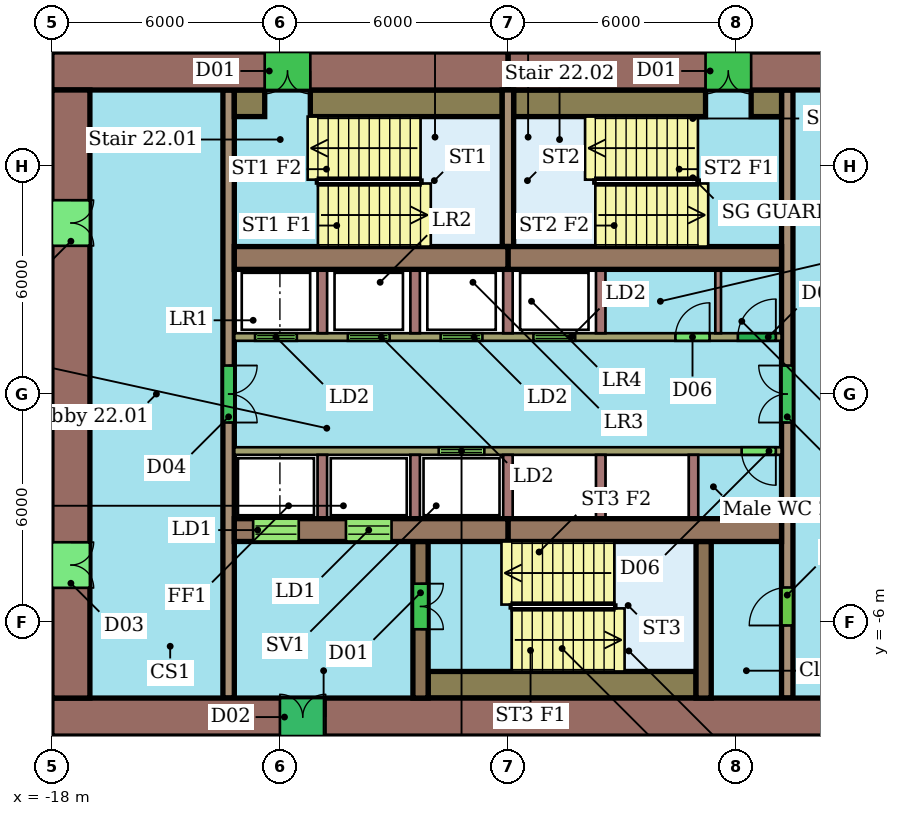
"""IFC4 building model, lengths in metres.
Left out: names, types, materials, properties, quantities, classifications, styles, units other than length and angle.
Written with IfcOpenShell. Run it as: python <this file> out.ifc"""

import sys

from ifc_helpers import new_model, si_unit, direction, frame, frame_2d, origin, place, context, subcontext, project, spatial, rectangle, extrude, element, fill, save


model = new_model("IFC4")
c1 = context("Model", 3, precision=1e-05, world=origin(), true_north=direction((0.0, 1.0)))
c2 = subcontext(c1, "Body", "Model", "MODEL_VIEW")
j1 = project(units=[si_unit("LENGTHUNIT", "METRE"), si_unit("PLANEANGLEUNIT", "RADIAN")], contexts=[c1])
p1 = place(None, origin())
s1 = spatial("IfcSite", under=j1, at=p1, CompositionType="ELEMENT")
p2 = place(p1, origin())
s2 = spatial("IfcBuilding", under=s1, at=p2, CompositionType="ELEMENT")
p3 = place(p2, frame((0.0, 0.0, 99.4)))
s3 = spatial("IfcBuildingStorey", under=s2, at=p3, CompositionType="ELEMENT", Elevation=99.4)
p4 = place(p3, frame((6.0, 8.5, 0.0), z_axis=(0.0, 0.0, 1.0), x_axis=(-1.0, 0.0, 0.0)))
e1 = element("IfcWall", 1, at=p4, inside=s3, PredefinedType="SHEAR", context=c2, shape_type="SweptSolid", body=[
    extrude(rectangle(XDim=12.0, YDim=1.0, at=frame_2d((6.0, 0.0))), origin(), (0.0, 0.0, 1.0), 3.3),
])
p5 = place(p4, frame((5.6, 0.0, 0.0)))
e2 = element("IfcOpeningElement", 2, at=p5, cuts=e1, PredefinedType="OPENING", context=c2, shape_type="SweptSolid", body=[
    extrude(rectangle(XDim=1.2, YDim=2.1, at=frame_2d((0.6, 1.05))), frame((0.0, 0.51, 0.0), z_axis=(0.0, -1.0, 0.0), x_axis=(1.0, 0.0, 0.0)), (0.0, 0.0, 1.0), 1.02),
])
p6 = place(p3, frame((-6.0, 8.5, 0.0), z_axis=(0.0, 0.0, 1.0), x_axis=(-1.0, 0.0, 0.0)))
e3 = element("IfcWall", 3, at=p6, inside=s3, PredefinedType="SHEAR", context=c2, shape_type="SweptSolid", body=[
    extrude(rectangle(XDim=12.0, YDim=1.0, at=frame_2d((6.0, 0.0))), origin(), (0.0, 0.0, 1.0), 3.3),
])
p7 = place(p6, frame((5.2, 0.0, 0.0)))
e4 = element("IfcOpeningElement", 4, at=p7, cuts=e3, PredefinedType="OPENING", context=c2, shape_type="SweptSolid", body=[
    extrude(rectangle(XDim=1.2, YDim=2.1, at=frame_2d((0.6, 1.05))), frame((0.0, 0.51, 0.0), z_axis=(0.0, -1.0, 0.0), x_axis=(1.0, 0.0, 0.0)), (0.0, 0.0, 1.0), 1.02),
])
p8 = place(p3, frame((-18.0, -8.5, 0.0), z_axis=(0.0, 0.0, 1.0), x_axis=(1.0, 0.0, 0.0)))
e5 = element("IfcWall", 5, at=p8, inside=s3, PredefinedType="SHEAR", context=c2, shape_type="SweptSolid", body=[
    extrude(rectangle(XDim=24.0, YDim=1.0, at=frame_2d((12.0, 0.0))), origin(), (0.0, 0.0, 1.0), 3.3),
])
p9 = place(p8, frame((6.0, 0.0, 0.0)))
e6 = element("IfcOpeningElement", 6, at=p9, cuts=e5, PredefinedType="OPENING", context=c2, shape_type="SweptSolid", body=[
    extrude(rectangle(XDim=1.2, YDim=2.1, at=frame_2d((0.6, 1.05))), frame((0.0, 0.51, 0.0), z_axis=(0.0, -1.0, 0.0), x_axis=(1.0, 0.0, 0.0)), (0.0, 0.0, 1.0), 1.02),
])
p10 = place(p3, frame((-17.5, 8.0, 0.0), z_axis=(0.0, 0.0, 1.0), x_axis=(0.0, -1.0, 0.0)))
e7 = element("IfcWall", 7, at=p10, inside=s3, PredefinedType="SHEAR", context=c2, shape_type="SweptSolid", body=[
    extrude(rectangle(XDim=16.0, YDim=1.0, at=frame_2d((8.0, 0.0))), origin(), (0.0, 0.0, 1.0), 3.3),
])
p11 = place(p10, frame((11.9, 0.0, 0.0)))
e8 = element("IfcOpeningElement", 8, at=p11, cuts=e7, PredefinedType="OPENING", context=c2, shape_type="SweptSolid", body=[
    extrude(rectangle(XDim=1.2, YDim=2.1, at=frame_2d((0.6, 1.05))), frame((0.0, 0.51, 0.0), z_axis=(0.0, -1.0, 0.0), x_axis=(1.0, 0.0, 0.0)), (0.0, 0.0, 1.0), 1.02),
])
p12 = place(p10, frame((2.9, 0.0, 0.0)))
e9 = element("IfcOpeningElement", 9, at=p12, cuts=e7, PredefinedType="OPENING", context=c2, shape_type="SweptSolid", body=[
    extrude(rectangle(XDim=1.2, YDim=2.1, at=frame_2d((0.6, 1.05))), frame((0.0, 0.51, 0.0), z_axis=(0.0, -1.0, 0.0), x_axis=(1.0, 0.0, 0.0)), (0.0, 0.0, 1.0), 1.02),
])
for number, where, z_axis, x_axis in (
    (10, (-13.2, 3.58, 0.0), (0.0, 0.0, 1.0), (1.0, 0.0, 0.0)),
    (11, (-6.0, 3.58, 0.0), (0.0, 0.0, 1.0), (1.0, 0.0, 0.0)),
):
    element("IfcWall", number, at=place(p3, frame(where, z_axis=z_axis, x_axis=x_axis)), inside=s3, PredefinedType="SHEAR", context=c2, shape_type="SweptSolid", body=[
        extrude(rectangle(XDim=7.2, YDim=0.6, at=frame_2d((3.6, 0.0))), origin(), (0.0, 0.0, 1.0), 3.3),
    ])
p13 = place(p3, frame((-13.2, -3.58, 0.0), z_axis=(0.0, 0.0, 1.0), x_axis=(1.0, 0.0, 0.0)))
e12 = element("IfcWall", 12, at=p13, inside=s3, PredefinedType="SHEAR", context=c2, shape_type="SweptSolid", body=[
    extrude(rectangle(XDim=7.2, YDim=0.6, at=frame_2d((3.6, 0.0))), origin(), (0.0, 0.0, 1.0), 3.3),
])
p14 = place(p13, frame((0.496, 0.0, 0.0)))
e13 = element("IfcOpeningElement", 13, at=p14, cuts=e12, PredefinedType="OPENING", context=c2, shape_type="SweptSolid", body=[
    extrude(rectangle(XDim=1.2, YDim=2.1, at=frame_2d((0.6, 1.05))), frame((0.0, 0.31, 0.0), z_axis=(0.0, -1.0, 0.0), x_axis=(1.0, 0.0, 0.0)), (0.0, 0.0, 1.0), 0.62),
])
p15 = place(p13, frame((2.938, 0.0, 0.0)))
e14 = element("IfcOpeningElement", 14, at=p15, cuts=e12, PredefinedType="OPENING", context=c2, shape_type="SweptSolid", body=[
    extrude(rectangle(XDim=1.2, YDim=2.1, at=frame_2d((0.6, 1.05))), frame((0.0, 0.31, 0.0), z_axis=(0.0, -1.0, 0.0), x_axis=(1.0, 0.0, 0.0)), (0.0, 0.0, 1.0), 0.62),
])
p16 = place(p3, frame((-6.0, -3.58, 0.0), z_axis=(0.0, 0.0, 1.0), x_axis=(1.0, 0.0, 0.0)))
e15 = element("IfcWall", 15, at=p16, inside=s3, PredefinedType="SHEAR", context=c2, shape_type="SweptSolid", body=[
    extrude(rectangle(XDim=7.2, YDim=0.6, at=frame_2d((3.6, 0.0))), origin(), (0.0, 0.0, 1.0), 3.3),
])
p17 = place(p3, frame((-13.35, 8.0, 0.0), z_axis=(0.0, 0.0, 1.0), x_axis=(0.0, -1.0, 0.0)))
e16 = element("IfcWall", 16, at=p17, inside=s3, PredefinedType="SHEAR", context=c2, shape_type="SweptSolid", body=[
    extrude(rectangle(XDim=16.0, YDim=0.3, at=frame_2d((8.0, 0.0))), origin(), (0.0, 0.0, 1.0), 3.3),
])
p18 = place(p17, frame((7.25, 0.0, 0.0)))
e17 = element("IfcOpeningElement", 17, at=p18, cuts=e16, PredefinedType="OPENING", context=c2, shape_type="SweptSolid", body=[
    extrude(rectangle(XDim=1.5, YDim=2.1, at=frame_2d((0.75, 1.05))), frame((0.0, 0.16, 0.0), z_axis=(0.0, -1.0, 0.0), x_axis=(1.0, 0.0, 0.0)), (0.0, 0.0, 1.0), 0.32),
])
p19 = place(p3, frame((1.35, -8.0, 0.0), z_axis=(0.0, 0.0, 1.0), x_axis=(0.0, 1.0, 0.0)))
e18 = element("IfcWall", 18, at=p19, inside=s3, PredefinedType="SHEAR", context=c2, shape_type="SweptSolid", body=[
    extrude(rectangle(XDim=16.0, YDim=0.3, at=frame_2d((8.0, 0.0))), origin(), (0.0, 0.0, 1.0), 3.3),
])
p20 = place(p19, frame((1.91, 0.0, 0.0)))
e19 = element("IfcOpeningElement", 19, at=p20, cuts=e18, PredefinedType="OPENING", context=c2, shape_type="SweptSolid", body=[
    extrude(rectangle(XDim=1.0, YDim=2.1, at=frame_2d((0.5, 1.05))), frame((0.0, 0.16, 0.0), z_axis=(0.0, -1.0, 0.0), x_axis=(1.0, 0.0, 0.0)), (0.0, 0.0, 1.0), 0.32),
])
p21 = place(p19, frame((7.25, 0.0, 0.0)))
e20 = element("IfcOpeningElement", 20, at=p21, cuts=e18, PredefinedType="OPENING", context=c2, shape_type="SweptSolid", body=[
    extrude(rectangle(XDim=1.5, YDim=2.1, at=frame_2d((0.75, 1.05))), frame((0.0, 0.16, 0.0), z_axis=(0.0, -1.0, 0.0), x_axis=(1.0, 0.0, 0.0)), (0.0, 0.0, 1.0), 0.32),
])
p22 = place(p3, frame((-13.2, 1.5, 0.0), z_axis=(0.0, 0.0, 1.0), x_axis=(1.0, 0.0, 0.0)))
e21 = element("IfcWall", 21, at=p22, inside=s3, PredefinedType="SHEAR", context=c2, shape_type="SweptSolid", body=[
    extrude(rectangle(XDim=14.4, YDim=0.2, at=frame_2d((7.2, 0.0))), origin(), (0.0, 0.0, 1.0), 3.3),
])
p23 = place(p22, frame((0.546, 0.0, 0.0)))
e22 = element("IfcOpeningElement", 22, at=p23, cuts=e21, PredefinedType="OPENING", context=c2, shape_type="SweptSolid", body=[
    extrude(rectangle(XDim=1.1, YDim=2.1, at=frame_2d((0.55, 1.05))), frame((0.0, 0.11, 0.0), z_axis=(0.0, -1.0, 0.0), x_axis=(1.0, 0.0, 0.0)), (0.0, 0.0, 1.0), 0.22),
])
p24 = place(p22, frame((2.988, 0.0, 0.0)))
e23 = element("IfcOpeningElement", 23, at=p24, cuts=e21, PredefinedType="OPENING", context=c2, shape_type="SweptSolid", body=[
    extrude(rectangle(XDim=1.1, YDim=2.1, at=frame_2d((0.55, 1.05))), frame((0.0, 0.11, 0.0), z_axis=(0.0, -1.0, 0.0), x_axis=(1.0, 0.0, 0.0)), (0.0, 0.0, 1.0), 0.22),
])
p25 = place(p22, frame((5.429, 0.0, 0.0)))
e24 = element("IfcOpeningElement", 24, at=p25, cuts=e21, PredefinedType="OPENING", context=c2, shape_type="SweptSolid", body=[
    extrude(rectangle(XDim=1.1, YDim=2.1, at=frame_2d((0.55, 1.05))), frame((0.0, 0.11, 0.0), z_axis=(0.0, -1.0, 0.0), x_axis=(1.0, 0.0, 0.0)), (0.0, 0.0, 1.0), 0.22),
])
p26 = place(p22, frame((7.871, 0.0, 0.0)))
e25 = element("IfcOpeningElement", 25, at=p26, cuts=e21, PredefinedType="OPENING", context=c2, shape_type="SweptSolid", body=[
    extrude(rectangle(XDim=1.1, YDim=2.1, at=frame_2d((0.55, 1.05))), frame((0.0, 0.11, 0.0), z_axis=(0.0, -1.0, 0.0), x_axis=(1.0, 0.0, 0.0)), (0.0, 0.0, 1.0), 0.22),
])
p27 = place(p22, frame((11.607, 0.0, 0.0)))
e26 = element("IfcOpeningElement", 26, at=p27, cuts=e21, PredefinedType="OPENING", context=c2, shape_type="SweptSolid", body=[
    extrude(rectangle(XDim=0.9, YDim=2.1, at=frame_2d((0.45, 1.05))), frame((0.0, 0.11, 0.0), z_axis=(0.0, -1.0, 0.0), x_axis=(1.0, 0.0, 0.0)), (0.0, 0.0, 1.0), 0.22),
])
p28 = place(p22, frame((13.25, 0.0, 0.0)))
e27 = element("IfcOpeningElement", 27, at=p28, cuts=e21, PredefinedType="OPENING", context=c2, shape_type="SweptSolid", body=[
    extrude(rectangle(XDim=1.0, YDim=2.1, at=frame_2d((0.5, 1.05))), frame((0.0, 0.11, 0.0), z_axis=(0.0, -1.0, 0.0), x_axis=(1.0, 0.0, 0.0)), (0.0, 0.0, 1.0), 0.22),
])
p29 = place(p3, frame((1.2, -1.5, 0.0), z_axis=(0.0, 0.0, 1.0), x_axis=(-1.0, 0.0, 0.0)))
e28 = element("IfcWall", 28, at=p29, inside=s3, PredefinedType="SHEAR", context=c2, shape_type="SweptSolid", body=[
    extrude(rectangle(XDim=14.4, YDim=0.2, at=frame_2d((7.2, 0.0))), origin(), (0.0, 0.0, 1.0), 3.3),
])
p30 = place(p29, frame((7.821, 0.0, 0.0)))
e29 = element("IfcOpeningElement", 29, at=p30, cuts=e28, PredefinedType="OPENING", context=c2, shape_type="SweptSolid", body=[
    extrude(rectangle(XDim=1.2, YDim=2.1, at=frame_2d((0.6, 1.05))), frame((0.0, 0.11, 0.0), z_axis=(0.0, -1.0, 0.0), x_axis=(1.0, 0.0, 0.0)), (0.0, 0.0, 1.0), 0.22),
])
p31 = place(p29, frame((0.15, 0.0, 0.0)))
e30 = element("IfcOpeningElement", 30, at=p31, cuts=e28, PredefinedType="OPENING", context=c2, shape_type="SweptSolid", body=[
    extrude(rectangle(XDim=0.9, YDim=2.1, at=frame_2d((0.45, 1.05))), frame((0.0, 0.11, 0.0), z_axis=(0.0, -1.0, 0.0), x_axis=(1.0, 0.0, 0.0)), (0.0, 0.0, 1.0), 0.22),
])
p32 = place(p3, frame((-8.3, -3.88, 0.0), z_axis=(0.0, 0.0, 1.0), x_axis=(0.0, -1.0, 0.0)))
e31 = element("IfcWall", 31, at=p32, inside=s3, PredefinedType="SHEAR", context=c2, shape_type="SweptSolid", body=[
    extrude(rectangle(XDim=4.12, YDim=0.4, at=frame_2d((2.06, 0.0))), origin(), (0.0, 0.0, 1.0), 3.3),
])
p33 = place(p32, frame((1.11, 0.0, 0.0)))
e32 = element("IfcOpeningElement", 32, at=p33, cuts=e31, PredefinedType="OPENING", context=c2, shape_type="SweptSolid", body=[
    extrude(rectangle(XDim=1.2, YDim=2.1, at=frame_2d((0.6, 1.05))), frame((0.0, 0.21, 0.0), z_axis=(0.0, -1.0, 0.0), x_axis=(1.0, 0.0, 0.0)), (0.0, 0.0, 1.0), 0.42),
])
p34 = place(p3, frame((-0.85, -3.88, 0.0), z_axis=(0.0, 0.0, 1.0), x_axis=(0.0, -1.0, 0.0)))
e33 = element("IfcWall", 33, at=p34, inside=s3, PredefinedType="SHEAR", context=c2, shape_type="SweptSolid", body=[
    extrude(rectangle(XDim=4.12, YDim=0.4, at=frame_2d((2.06, 0.0))), origin(), (0.0, 0.0, 1.0), 3.3),
])
p35 = place(p3, frame((-6.0, 3.88, 0.0), z_axis=(0.0, 0.0, 1.0), x_axis=(0.0, 1.0, 0.0)))
e34 = element("IfcWall", 34, at=p35, inside=s3, PredefinedType="SHEAR", context=c2, shape_type="SweptSolid", body=[
    extrude(rectangle(XDim=4.12, YDim=0.3, at=frame_2d((2.06, 0.0))), origin(), (0.0, 0.0, 1.0), 3.3),
])
p36 = place(p3, frame((-13.2, 7.65, 0.0), z_axis=(0.0, 0.0, 1.0), x_axis=(1.0, 0.0, 0.0)))
e35 = element("IfcWall", 35, at=p36, inside=s3, PredefinedType="SHEAR", context=c2, shape_type="SweptSolid", body=[
    extrude(rectangle(XDim=0.8, YDim=0.7, at=frame_2d((0.4, 0.0))), origin(), (0.0, 0.0, 1.0), 3.3),
])
for number, where, z_axis, x_axis in (
    (36, (-11.2, 7.65, 0.0), (0.0, 0.0, 1.0), (1.0, 0.0, 0.0)),
    (37, (-5.85, 7.65, 0.0), (0.0, 0.0, 1.0), (1.0, 0.0, 0.0)),
):
    element("IfcWall", number, at=place(p3, frame(where, z_axis=z_axis, x_axis=x_axis)), inside=s3, PredefinedType="SHEAR", context=c2, shape_type="SweptSolid", body=[
        extrude(rectangle(XDim=5.05, YDim=0.7, at=frame_2d((2.525, 0.0))), origin(), (0.0, 0.0, 1.0), 3.3),
    ])
p37 = place(p3, frame((0.4, 7.65, 0.0), z_axis=(0.0, 0.0, 1.0), x_axis=(1.0, 0.0, 0.0)))
e38 = element("IfcWall", 38, at=p37, inside=s3, PredefinedType="SHEAR", context=c2, shape_type="SweptSolid", body=[
    extrude(rectangle(XDim=0.8, YDim=0.7, at=frame_2d((0.4, 0.0))), origin(), (0.0, 0.0, 1.0), 3.3),
])
p38 = place(p3, frame((-8.1, -7.65, 0.0), z_axis=(0.0, 0.0, 1.0), x_axis=(1.0, 0.0, 0.0)))
e39 = element("IfcWall", 39, at=p38, inside=s3, PredefinedType="SHEAR", context=c2, shape_type="SweptSolid", body=[
    extrude(rectangle(XDim=7.05, YDim=0.7, at=frame_2d((3.525, 0.0))), origin(), (0.0, 0.0, 1.0), 3.3),
])
for number, where, z_axis, x_axis in (
    (40, (-10.883, 1.6, 0.0), (0.0, 0.0, 1.0), (0.0, 1.0, 0.0)),
    (41, (-8.442, 1.6, 0.0), (0.0, 0.0, 1.0), (0.0, 1.0, 0.0)),
    (42, (-6.0, 1.6, 0.0), (0.0, 0.0, 1.0), (0.0, 1.0, 0.0)),
    (43, (-3.558, 1.6, 0.0), (0.0, 0.0, 1.0), (0.0, 1.0, 0.0)),
):
    element("IfcWall", number, at=place(p3, frame(where, z_axis=z_axis, x_axis=x_axis)), inside=s3, PredefinedType="SHEAR", context=c2, shape_type="SweptSolid", body=[
        extrude(rectangle(XDim=1.68, YDim=0.25, at=frame_2d((0.84, 0.0))), origin(), (0.0, 0.0, 1.0), 3.3),
    ])
p39 = place(p3, frame((-0.468, 1.6, 0.0), z_axis=(0.0, 0.0, 1.0), x_axis=(0.0, 1.0, 0.0)))
e44 = element("IfcWall", 44, at=p39, inside=s3, PredefinedType="PARTITIONING", context=c2, shape_type="SweptSolid", body=[
    extrude(rectangle(XDim=1.68, YDim=0.15, at=frame_2d((0.84, 0.0))), origin(), (0.0, 0.0, 1.0), 3.3),
])
for number, where, z_axis, x_axis in (
    (45, (-10.883, -1.6, 0.0), (0.0, 0.0, 1.0), (0.0, -1.0, 0.0)),
    (46, (-8.442, -1.6, 0.0), (0.0, 0.0, 1.0), (0.0, -1.0, 0.0)),
    (47, (-6.0, -1.6, 0.0), (0.0, 0.0, 1.0), (0.0, -1.0, 0.0)),
    (48, (-3.558, -1.6, 0.0), (0.0, 0.0, 1.0), (0.0, -1.0, 0.0)),
    (49, (-1.117, -1.6, 0.0), (0.0, 0.0, 1.0), (0.0, -1.0, 0.0)),
):
    element("IfcWall", number, at=place(p3, frame(where, z_axis=z_axis, x_axis=x_axis)), inside=s3, PredefinedType="SHEAR", context=c2, shape_type="SweptSolid", body=[
        extrude(rectangle(XDim=1.68, YDim=0.25, at=frame_2d((0.84, 0.0))), origin(), (0.0, 0.0, 1.0), 3.3),
    ])
p40 = place(p5, origin())
e50 = element("IfcDoor", 50, at=p40, inside=s3, OperationType="DOUBLE_DOOR_SINGLE_SWING", PredefinedType="NOTDEFINED", context=c2, shape_type="SweptSolid", body=[
    extrude(rectangle(XDim=1.2, YDim=2.1, at=frame_2d((0.6, 1.05))), frame((0.0, 0.025, 0.0), z_axis=(0.0, -1.0, 0.0), x_axis=(1.0, 0.0, 0.0)), (0.0, 0.0, 1.0), 0.05),
])
fill(e2, e50)
p41 = place(p7, origin())
e51 = element("IfcDoor", 51, at=p41, inside=s3, OperationType="DOUBLE_DOOR_SINGLE_SWING", PredefinedType="NOTDEFINED", context=c2, shape_type="SweptSolid", body=[
    extrude(rectangle(XDim=1.2, YDim=2.1, at=frame_2d((0.6, 1.05))), frame((0.0, 0.025, 0.0), z_axis=(0.0, -1.0, 0.0), x_axis=(1.0, 0.0, 0.0)), (0.0, 0.0, 1.0), 0.05),
])
fill(e4, e51)
p42 = place(p9, origin())
e52 = element("IfcDoor", 52, at=p42, inside=s3, OperationType="DOUBLE_DOOR_SINGLE_SWING", PredefinedType="NOTDEFINED", context=c2, shape_type="SweptSolid", body=[
    extrude(rectangle(XDim=1.2, YDim=2.1, at=frame_2d((0.6, 1.05))), frame((0.0, 0.025, 0.0), z_axis=(0.0, -1.0, 0.0), x_axis=(1.0, 0.0, 0.0)), (0.0, 0.0, 1.0), 0.05),
])
fill(e6, e52)
p43 = place(p11, origin())
e53 = element("IfcDoor", 53, at=p43, inside=s3, OperationType="DOUBLE_DOOR_SINGLE_SWING", PredefinedType="NOTDEFINED", context=c2, shape_type="SweptSolid", body=[
    extrude(rectangle(XDim=1.2, YDim=2.1, at=frame_2d((0.6, 1.05))), frame((0.0, 0.025, 0.0), z_axis=(0.0, -1.0, 0.0), x_axis=(1.0, 0.0, 0.0)), (0.0, 0.0, 1.0), 0.05),
])
fill(e8, e53)
p44 = place(p12, origin())
e54 = element("IfcDoor", 54, at=p44, inside=s3, OperationType="DOUBLE_DOOR_SINGLE_SWING", PredefinedType="NOTDEFINED", context=c2, shape_type="SweptSolid", body=[
    extrude(rectangle(XDim=1.2, YDim=2.1, at=frame_2d((0.6, 1.05))), frame((0.0, 0.025, 0.0), z_axis=(0.0, -1.0, 0.0), x_axis=(1.0, 0.0, 0.0)), (0.0, 0.0, 1.0), 0.05),
])
fill(e9, e54)
p45 = place(p14, origin())
e55 = element("IfcDoor", 55, at=p45, inside=s3, OperationType="DOUBLE_DOOR_SLIDING", PredefinedType="NOTDEFINED", context=c2, shape_type="SweptSolid", body=[
    extrude(rectangle(XDim=1.2, YDim=2.1, at=frame_2d((0.6, 1.05))), frame((0.0, 0.025, 0.0), z_axis=(0.0, -1.0, 0.0), x_axis=(1.0, 0.0, 0.0)), (0.0, 0.0, 1.0), 0.05),
])
fill(e13, e55)
p46 = place(p15, origin())
e56 = element("IfcDoor", 56, at=p46, inside=s3, OperationType="DOUBLE_DOOR_SLIDING", PredefinedType="NOTDEFINED", context=c2, shape_type="SweptSolid", body=[
    extrude(rectangle(XDim=1.2, YDim=2.1, at=frame_2d((0.6, 1.05))), frame((0.0, 0.025, 0.0), z_axis=(0.0, -1.0, 0.0), x_axis=(1.0, 0.0, 0.0)), (0.0, 0.0, 1.0), 0.05),
])
fill(e14, e56)
p47 = place(p18, origin())
e57 = element("IfcDoor", 57, at=p47, inside=s3, OperationType="DOUBLE_DOOR_SINGLE_SWING", PredefinedType="NOTDEFINED", context=c2, shape_type="SweptSolid", body=[
    extrude(rectangle(XDim=1.5, YDim=2.1, at=frame_2d((0.75, 1.05))), frame((0.0, 0.025, 0.0), z_axis=(0.0, -1.0, 0.0), x_axis=(1.0, 0.0, 0.0)), (0.0, 0.0, 1.0), 0.05),
])
fill(e17, e57)
p48 = place(p20, origin())
e58 = element("IfcDoor", 58, at=p48, inside=s3, OperationType="SINGLE_SWING_LEFT", PredefinedType="NOTDEFINED", context=c2, shape_type="SweptSolid", body=[
    extrude(rectangle(XDim=1.0, YDim=2.1, at=frame_2d((0.5, 1.05))), frame((0.0, 0.025, 0.0), z_axis=(0.0, -1.0, 0.0), x_axis=(1.0, 0.0, 0.0)), (0.0, 0.0, 1.0), 0.05),
])
fill(e19, e58)
p49 = place(p21, origin())
e59 = element("IfcDoor", 59, at=p49, inside=s3, OperationType="DOUBLE_DOOR_SINGLE_SWING", PredefinedType="NOTDEFINED", context=c2, shape_type="SweptSolid", body=[
    extrude(rectangle(XDim=1.5, YDim=2.1, at=frame_2d((0.75, 1.05))), frame((0.0, 0.025, 0.0), z_axis=(0.0, -1.0, 0.0), x_axis=(1.0, 0.0, 0.0)), (0.0, 0.0, 1.0), 0.05),
])
fill(e20, e59)
p50 = place(p23, origin())
e60 = element("IfcDoor", 60, at=p50, inside=s3, OperationType="DOUBLE_DOOR_SLIDING", PredefinedType="NOTDEFINED", context=c2, shape_type="SweptSolid", body=[
    extrude(rectangle(XDim=1.1, YDim=2.1, at=frame_2d((0.55, 1.05))), frame((0.0, 0.025, 0.0), z_axis=(0.0, -1.0, 0.0), x_axis=(1.0, 0.0, 0.0)), (0.0, 0.0, 1.0), 0.05),
])
fill(e22, e60)
p51 = place(p24, origin())
e61 = element("IfcDoor", 61, at=p51, inside=s3, OperationType="DOUBLE_DOOR_SLIDING", PredefinedType="NOTDEFINED", context=c2, shape_type="SweptSolid", body=[
    extrude(rectangle(XDim=1.1, YDim=2.1, at=frame_2d((0.55, 1.05))), frame((0.0, 0.025, 0.0), z_axis=(0.0, -1.0, 0.0), x_axis=(1.0, 0.0, 0.0)), (0.0, 0.0, 1.0), 0.05),
])
fill(e23, e61)
p52 = place(p25, origin())
e62 = element("IfcDoor", 62, at=p52, inside=s3, OperationType="DOUBLE_DOOR_SLIDING", PredefinedType="NOTDEFINED", context=c2, shape_type="SweptSolid", body=[
    extrude(rectangle(XDim=1.1, YDim=2.1, at=frame_2d((0.55, 1.05))), frame((0.0, 0.025, 0.0), z_axis=(0.0, -1.0, 0.0), x_axis=(1.0, 0.0, 0.0)), (0.0, 0.0, 1.0), 0.05),
])
fill(e24, e62)
p53 = place(p26, origin())
e63 = element("IfcDoor", 63, at=p53, inside=s3, OperationType="DOUBLE_DOOR_SLIDING", PredefinedType="NOTDEFINED", context=c2, shape_type="SweptSolid", body=[
    extrude(rectangle(XDim=1.1, YDim=2.1, at=frame_2d((0.55, 1.05))), frame((0.0, 0.025, 0.0), z_axis=(0.0, -1.0, 0.0), x_axis=(1.0, 0.0, 0.0)), (0.0, 0.0, 1.0), 0.05),
])
fill(e25, e63)
p54 = place(p27, origin())
e64 = element("IfcDoor", 64, at=p54, inside=s3, OperationType="SINGLE_SWING_RIGHT", PredefinedType="NOTDEFINED", context=c2, shape_type="SweptSolid", body=[
    extrude(rectangle(XDim=0.9, YDim=2.1, at=frame_2d((0.45, 1.05))), frame((0.0, 0.025, 0.0), z_axis=(0.0, -1.0, 0.0), x_axis=(1.0, 0.0, 0.0)), (0.0, 0.0, 1.0), 0.05),
])
fill(e26, e64)
p55 = place(p28, origin())
e65 = element("IfcDoor", 65, at=p55, inside=s3, OperationType="SINGLE_SWING_RIGHT", PredefinedType="NOTDEFINED", context=c2, shape_type="SweptSolid", body=[
    extrude(rectangle(XDim=1.0, YDim=2.1, at=frame_2d((0.5, 1.05))), frame((0.0, 0.025, 0.0), z_axis=(0.0, -1.0, 0.0), x_axis=(1.0, 0.0, 0.0)), (0.0, 0.0, 1.0), 0.05),
])
fill(e27, e65)
p56 = place(p30, origin())
e66 = element("IfcDoor", 66, at=p56, inside=s3, OperationType="DOUBLE_DOOR_SLIDING", PredefinedType="NOTDEFINED", context=c2, shape_type="SweptSolid", body=[
    extrude(rectangle(XDim=1.2, YDim=2.1, at=frame_2d((0.6, 1.05))), frame((0.0, 0.025, 0.0), z_axis=(0.0, -1.0, 0.0), x_axis=(1.0, 0.0, 0.0)), (0.0, 0.0, 1.0), 0.05),
])
fill(e29, e66)
p57 = place(p31, origin())
e67 = element("IfcDoor", 67, at=p57, inside=s3, OperationType="SINGLE_SWING_LEFT", PredefinedType="NOTDEFINED", context=c2, shape_type="SweptSolid", body=[
    extrude(rectangle(XDim=0.9, YDim=2.1, at=frame_2d((0.45, 1.05))), frame((0.0, 0.025, 0.0), z_axis=(0.0, -1.0, 0.0), x_axis=(1.0, 0.0, 0.0)), (0.0, 0.0, 1.0), 0.05),
])
fill(e30, e67)
p58 = place(p33, origin())
e68 = element("IfcDoor", 68, at=p58, inside=s3, OperationType="DOUBLE_DOOR_SINGLE_SWING", PredefinedType="NOTDEFINED", context=c2, shape_type="SweptSolid", body=[
    extrude(rectangle(XDim=1.2, YDim=2.1, at=frame_2d((0.6, 1.05))), frame((0.0, 0.025, 0.0), z_axis=(0.0, -1.0, 0.0), x_axis=(1.0, 0.0, 0.0)), (0.0, 0.0, 1.0), 0.05),
])
fill(e32, e68)
save(model, sys.argv[1])
